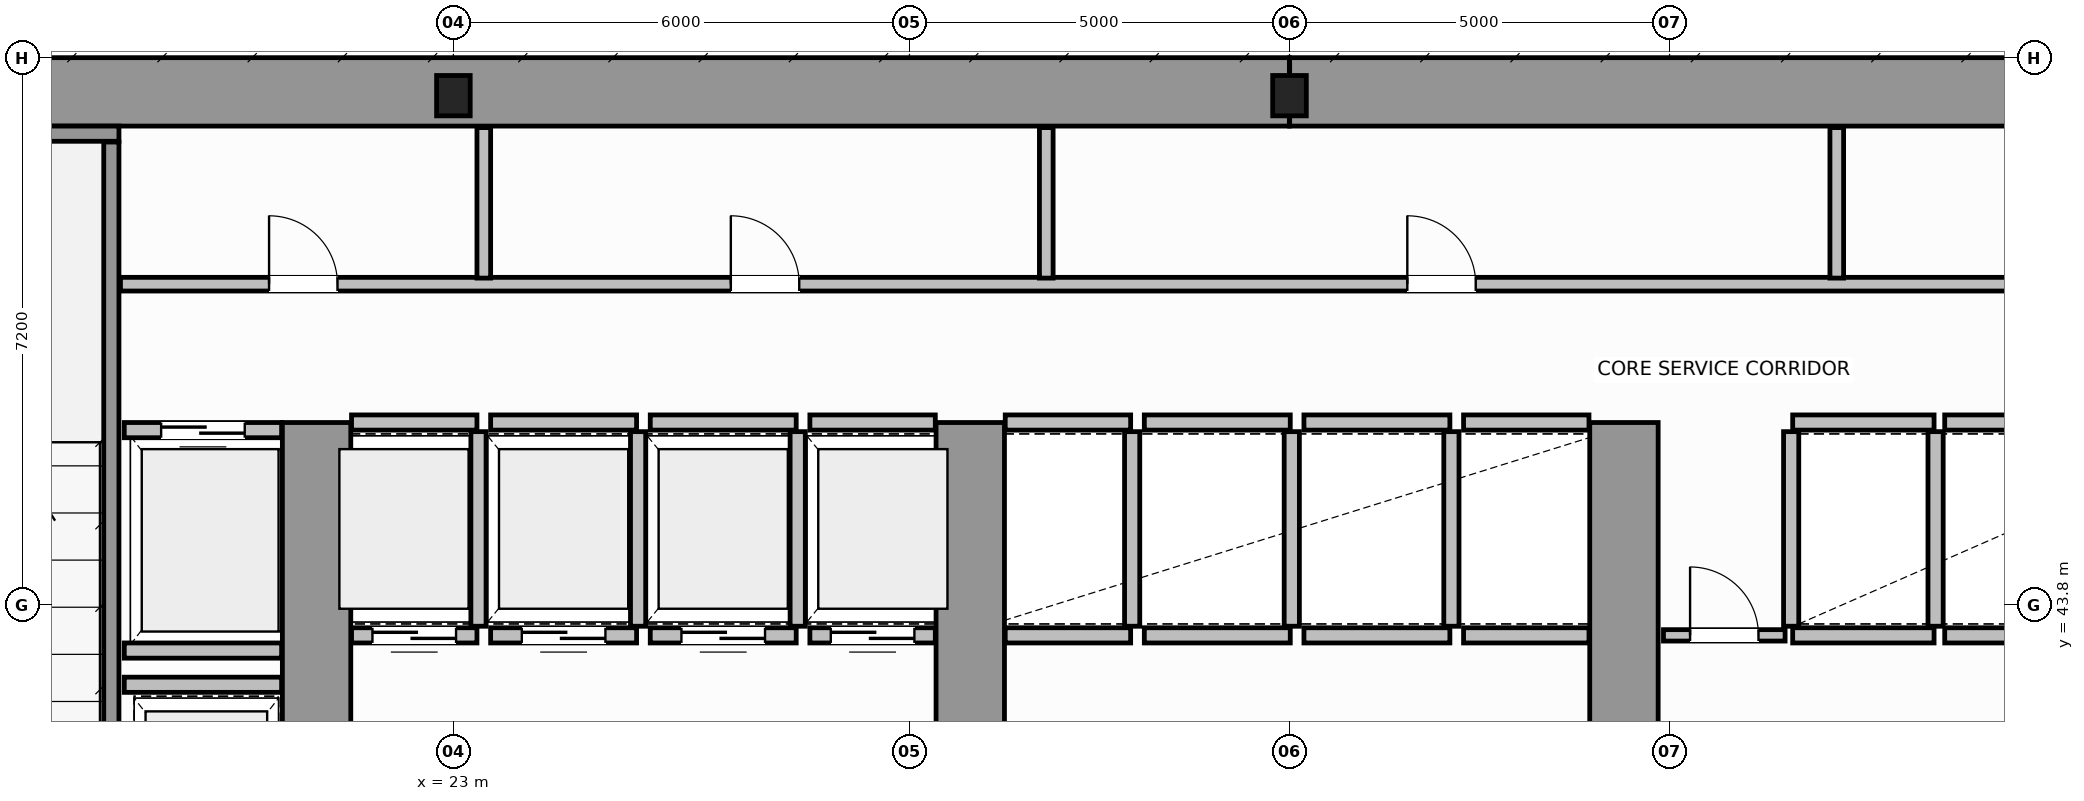
"""IFC4 building model, lengths in metres.
Left out: names, types, materials, properties, quantities, classifications, styles, units other than length and angle.
Written with IfcOpenShell. Run it as: python <this file> out.ifc"""

import sys

from ifc_helpers import new_model, si_unit, direction, frame, frame_2d, origin, origin_2d, place, context, subcontext, project, spatial, rectangle, i_section, extrude, source, transform, mapped, element, fill, save


model = new_model("IFC4")
c1 = context("Model", 3, precision=1e-05, world=origin(), true_north=direction((0.0, 1.0)))
c2 = subcontext(c1, "Body", "Model", "MODEL_VIEW")
j1 = project(units=[si_unit("LENGTHUNIT", "METRE"), si_unit("PLANEANGLEUNIT", "RADIAN")], contexts=[c1])
p1 = place(None, origin())
s1 = spatial("IfcSite", under=j1, at=p1, CompositionType="ELEMENT")
p2 = place(p1, origin())
s2 = spatial("IfcBuilding", under=s1, at=p2, CompositionType="ELEMENT")
p3 = place(p2, frame((0.0, 0.0, 83.4)))
s3 = spatial("IfcBuildingStorey", under=s2, at=p3, CompositionType="ELEMENT", Elevation=83.4)
m1 = source(origin(), c2, "Body", "SweptSolid", [
    extrude(i_section(OverallWidth=0.442, OverallDepth=0.531, WebThickness=0.065, FlangeThickness=0.076, FilletRadius=0.015, at=origin_2d()), origin(), (0.0, 0.0, 1.0), 4.8),
])
for number, where, z_axis, x_axis in (
    (1, (23.0, 50.5, 0.0), (0.0, 0.0, 1.0), (1.0, 0.0, 0.0)),
    (2, (34.0, 50.5, 0.0), (0.0, 0.0, 1.0), (1.0, 0.0, 0.0)),
):
    element("IfcColumn", number, at=place(p3, frame(where, z_axis=z_axis, x_axis=x_axis)), inside=s3, PredefinedType="COLUMN", context=c2, shape_type="MappedRepresentation", body=[
        mapped(m1, transform((0.0, 0.0, 0.0), scale=1.0)),
    ])
for number, where, z_axis, x_axis in (
    (3, (14.454, 50.55, 0.0), (0.0, 0.0, 1.0), (1.0, 0.0, 0.0)),
    (4, (34.002, 50.55, 0.0), (0.0, 0.0, 1.0), (1.0, 0.0, 0.0)),
):
    element("IfcWall", number, at=place(p3, frame(where, z_axis=z_axis, x_axis=x_axis)), inside=s3, PredefinedType="SHEAR", context=c2, shape_type="SweptSolid", body=[
        extrude(rectangle(XDim=19.544, YDim=0.9, at=frame_2d((9.772, 0.0))), origin(), (0.0, 0.0, 1.0), 4.8),
    ])
p4 = place(p3, frame((21.2, 36.97, 0.0), z_axis=(0.0, 0.0, 1.0), x_axis=(0.0, 1.0, 0.0)))
e5 = element("IfcWall", 5, at=p4, inside=s3, PredefinedType="SHEAR", context=c2, shape_type="SweptSolid", body=[
    extrude(rectangle(XDim=9.23, YDim=0.9, at=frame_2d((4.615, 0.0))), origin(), (0.0, 0.0, 1.0), 4.8),
])
p5 = place(p3, frame((29.8, 36.97, 0.0), z_axis=(0.0, 0.0, 1.0), x_axis=(0.0, 1.0, 0.0)))
e6 = element("IfcWall", 6, at=p5, inside=s3, PredefinedType="SHEAR", context=c2, shape_type="SweptSolid", body=[
    extrude(rectangle(XDim=9.23, YDim=0.9, at=frame_2d((4.615, 0.0))), origin(), (0.0, 0.0, 1.0), 4.8),
])
p6 = place(p5, frame((4.05, 0.0, 0.0)))
e7 = element("IfcOpeningElement", 7, at=p6, cuts=e6, PredefinedType="OPENING", context=c2, shape_type="SweptSolid", body=[
    extrude(rectangle(XDim=1.1, YDim=2.15, at=frame_2d((0.55, 1.075))), frame((0.0, 0.46, 0.0), z_axis=(0.0, -1.0, 0.0), x_axis=(1.0, 0.0, 0.0)), (0.0, 0.0, 1.0), 0.92),
])
p7 = place(p3, frame((38.4, 36.97, 0.0), z_axis=(0.0, 0.0, 1.0), x_axis=(0.0, 1.0, 0.0)))
e8 = element("IfcWall", 8, at=p7, inside=s3, PredefinedType="SHEAR", context=c2, shape_type="SweptSolid", body=[
    extrude(rectangle(XDim=9.23, YDim=0.9, at=frame_2d((4.615, 0.0))), origin(), (0.0, 0.0, 1.0), 4.8),
])
p8 = place(p7, frame((4.05, 0.0, 0.0)))
e9 = element("IfcOpeningElement", 9, at=p8, cuts=e8, PredefinedType="OPENING", context=c2, shape_type="SweptSolid", body=[
    extrude(rectangle(XDim=1.1, YDim=2.15, at=frame_2d((0.55, 1.075))), frame((0.0, 0.46, 0.0), z_axis=(0.0, -1.0, 0.0), x_axis=(1.0, 0.0, 0.0)), (0.0, 0.0, 1.0), 0.92),
])
p9 = place(p3, frame((14.45, 50.0, 0.0), z_axis=(0.0, 0.0, 1.0), x_axis=(1.0, 0.0, 0.0)))
e10 = element("IfcWall", 10, at=p9, inside=s3, PredefinedType="SOLIDWALL", context=c2, shape_type="SweptSolid", body=[
    extrude(rectangle(XDim=4.15, YDim=0.2, at=frame_2d((2.075, 0.0))), origin(), (0.0, 0.0, 1.0), 4.8),
])
p10 = place(p3, frame((18.5, 39.96, 0.0), z_axis=(0.0, 0.0, 1.0), x_axis=(0.0, 1.0, 0.0)))
e11 = element("IfcWall", 11, at=p10, inside=s3, PredefinedType="SOLIDWALL", context=c2, shape_type="SweptSolid", body=[
    extrude(rectangle(XDim=9.93, YDim=0.2, at=frame_2d((4.965, 0.0))), origin(), (0.0, 0.0, 1.0), 4.8),
])
p11 = place(p3, frame((21.66, 43.4, 0.0), z_axis=(0.0, 0.0, 1.0), x_axis=(1.0, 0.0, 0.0)))
e12 = element("IfcWall", 12, at=p11, inside=s3, PredefinedType="SOLIDWALL", context=c2, shape_type="SweptSolid", body=[
    extrude(rectangle(XDim=1.65, YDim=0.2, at=frame_2d((0.825, 0.0))), origin(), (0.0, 0.0, 1.0), 4.54),
])
p12 = place(p11, frame((0.275, 0.0, 0.0)))
e13 = element("IfcOpeningElement", 13, at=p12, cuts=e12, PredefinedType="OPENING", context=c2, shape_type="SweptSolid", body=[
    extrude(rectangle(XDim=1.1, YDim=2.15, at=frame_2d((0.55, 1.075))), frame((0.0, 0.11, 0.0), z_axis=(0.0, -1.0, 0.0), x_axis=(1.0, 0.0, 0.0)), (0.0, 0.0, 1.0), 0.22),
])
p13 = place(p3, frame((21.66, 46.2, 0.0), z_axis=(0.0, 0.0, 1.0), x_axis=(1.0, 0.0, 0.0)))
e14 = element("IfcWall", 14, at=p13, inside=s3, PredefinedType="SOLIDWALL", context=c2, shape_type="SweptSolid", body=[
    extrude(rectangle(XDim=1.65, YDim=0.2, at=frame_2d((0.825, 0.0))), origin(), (0.0, 0.0, 1.0), 4.54),
])
p14 = place(p3, frame((23.33, 43.52, 0.0), z_axis=(0.0, 0.0, 1.0), x_axis=(0.0, 1.0, 0.0)))
e15 = element("IfcWall", 15, at=p14, inside=s3, PredefinedType="SOLIDWALL", context=c2, shape_type="SweptSolid", body=[
    extrude(rectangle(XDim=2.56, YDim=0.2, at=frame_2d((1.28, 0.0))), origin(), (0.0, 0.0, 1.0), 4.54),
])
p15 = place(p3, frame((23.49, 43.4, 0.0), z_axis=(0.0, 0.0, 1.0), x_axis=(1.0, 0.0, 0.0)))
e16 = element("IfcWall", 16, at=p15, inside=s3, PredefinedType="SOLIDWALL", context=c2, shape_type="SweptSolid", body=[
    extrude(rectangle(XDim=1.92, YDim=0.2, at=frame_2d((0.96, 0.0))), origin(), (0.0, 0.0, 1.0), 4.54),
])
p16 = place(p15, frame((0.41, 0.0, 0.0)))
e17 = element("IfcOpeningElement", 17, at=p16, cuts=e16, PredefinedType="OPENING", context=c2, shape_type="SweptSolid", body=[
    extrude(rectangle(XDim=1.1, YDim=2.15, at=frame_2d((0.55, 1.075))), frame((0.0, 0.11, 0.0), z_axis=(0.0, -1.0, 0.0), x_axis=(1.0, 0.0, 0.0)), (0.0, 0.0, 1.0), 0.22),
])
p17 = place(p3, frame((23.49, 46.2, 0.0), z_axis=(0.0, 0.0, 1.0), x_axis=(1.0, 0.0, 0.0)))
e18 = element("IfcWall", 18, at=p17, inside=s3, PredefinedType="SOLIDWALL", context=c2, shape_type="SweptSolid", body=[
    extrude(rectangle(XDim=1.92, YDim=0.2, at=frame_2d((0.96, 0.0))), origin(), (0.0, 0.0, 1.0), 4.54),
])
p18 = place(p3, frame((25.43, 43.52, 0.0), z_axis=(0.0, 0.0, 1.0), x_axis=(0.0, 1.0, 0.0)))
e19 = element("IfcWall", 19, at=p18, inside=s3, PredefinedType="SOLIDWALL", context=c2, shape_type="SweptSolid", body=[
    extrude(rectangle(XDim=2.56, YDim=0.2, at=frame_2d((1.28, 0.0))), origin(), (0.0, 0.0, 1.0), 4.54),
])
p19 = place(p3, frame((25.59, 43.4, 0.0), z_axis=(0.0, 0.0, 1.0), x_axis=(1.0, 0.0, 0.0)))
e20 = element("IfcWall", 20, at=p19, inside=s3, PredefinedType="SOLIDWALL", context=c2, shape_type="SweptSolid", body=[
    extrude(rectangle(XDim=1.92, YDim=0.2, at=frame_2d((0.96, 0.0))), origin(), (0.0, 0.0, 1.0), 4.54),
])
p20 = place(p19, frame((0.41, 0.0, 0.0)))
e21 = element("IfcOpeningElement", 21, at=p20, cuts=e20, PredefinedType="OPENING", context=c2, shape_type="SweptSolid", body=[
    extrude(rectangle(XDim=1.1, YDim=2.15, at=frame_2d((0.55, 1.075))), frame((0.0, 0.11, 0.0), z_axis=(0.0, -1.0, 0.0), x_axis=(1.0, 0.0, 0.0)), (0.0, 0.0, 1.0), 0.22),
])
p21 = place(p3, frame((25.59, 46.2, 0.0), z_axis=(0.0, 0.0, 1.0), x_axis=(1.0, 0.0, 0.0)))
e22 = element("IfcWall", 22, at=p21, inside=s3, PredefinedType="SOLIDWALL", context=c2, shape_type="SweptSolid", body=[
    extrude(rectangle(XDim=1.92, YDim=0.2, at=frame_2d((0.96, 0.0))), origin(), (0.0, 0.0, 1.0), 4.54),
])
p22 = place(p3, frame((27.53, 43.52, 0.0), z_axis=(0.0, 0.0, 1.0), x_axis=(0.0, 1.0, 0.0)))
e23 = element("IfcWall", 23, at=p22, inside=s3, PredefinedType="SOLIDWALL", context=c2, shape_type="SweptSolid", body=[
    extrude(rectangle(XDim=2.56, YDim=0.2, at=frame_2d((1.28, 0.0))), origin(), (0.0, 0.0, 1.0), 4.54),
])
p23 = place(p3, frame((27.69, 43.4, 0.0), z_axis=(0.0, 0.0, 1.0), x_axis=(1.0, 0.0, 0.0)))
e24 = element("IfcWall", 24, at=p23, inside=s3, PredefinedType="SOLIDWALL", context=c2, shape_type="SweptSolid", body=[
    extrude(rectangle(XDim=1.65, YDim=0.2, at=frame_2d((0.825, 0.0))), origin(), (0.0, 0.0, 1.0), 4.54),
])
p24 = place(p23, frame((0.275, 0.0, 0.0)))
e25 = element("IfcOpeningElement", 25, at=p24, cuts=e24, PredefinedType="OPENING", context=c2, shape_type="SweptSolid", body=[
    extrude(rectangle(XDim=1.1, YDim=2.15, at=frame_2d((0.55, 1.075))), frame((0.0, 0.11, 0.0), z_axis=(0.0, -1.0, 0.0), x_axis=(1.0, 0.0, 0.0)), (0.0, 0.0, 1.0), 0.22),
])
p25 = place(p3, frame((27.69, 46.2, 0.0), z_axis=(0.0, 0.0, 1.0), x_axis=(1.0, 0.0, 0.0)))
e26 = element("IfcWall", 26, at=p25, inside=s3, PredefinedType="SOLIDWALL", context=c2, shape_type="SweptSolid", body=[
    extrude(rectangle(XDim=1.65, YDim=0.2, at=frame_2d((0.825, 0.0))), origin(), (0.0, 0.0, 1.0), 4.54),
])
for number, where, z_axis, x_axis in (
    (27, (30.26, 43.4, 0.0), (0.0, 0.0, 1.0), (1.0, 0.0, 0.0)),
    (28, (30.26, 46.2, 0.0), (0.0, 0.0, 1.0), (1.0, 0.0, 0.0)),
):
    element("IfcWall", number, at=place(p3, frame(where, z_axis=z_axis, x_axis=x_axis)), inside=s3, PredefinedType="SOLIDWALL", context=c2, shape_type="SweptSolid", body=[
        extrude(rectangle(XDim=1.65, YDim=0.2, at=frame_2d((0.825, 0.0))), origin(), (0.0, 0.0, 1.0), 4.54),
    ])
p26 = place(p3, frame((31.93, 43.52, 0.0), z_axis=(0.0, 0.0, 1.0), x_axis=(0.0, 1.0, 0.0)))
e29 = element("IfcWall", 29, at=p26, inside=s3, PredefinedType="SOLIDWALL", context=c2, shape_type="SweptSolid", body=[
    extrude(rectangle(XDim=2.56, YDim=0.2, at=frame_2d((1.28, 0.0))), origin(), (0.0, 0.0, 1.0), 4.54),
])
for number, where, z_axis, x_axis in (
    (30, (32.09, 43.4, 0.0), (0.0, 0.0, 1.0), (1.0, 0.0, 0.0)),
    (31, (32.09, 46.2, 0.0), (0.0, 0.0, 1.0), (1.0, 0.0, 0.0)),
):
    element("IfcWall", number, at=place(p3, frame(where, z_axis=z_axis, x_axis=x_axis)), inside=s3, PredefinedType="SOLIDWALL", context=c2, shape_type="SweptSolid", body=[
        extrude(rectangle(XDim=1.92, YDim=0.2, at=frame_2d((0.96, 0.0))), origin(), (0.0, 0.0, 1.0), 4.54),
    ])
p27 = place(p3, frame((34.03, 43.52, 0.0), z_axis=(0.0, 0.0, 1.0), x_axis=(0.0, 1.0, 0.0)))
e32 = element("IfcWall", 32, at=p27, inside=s3, PredefinedType="SOLIDWALL", context=c2, shape_type="SweptSolid", body=[
    extrude(rectangle(XDim=2.56, YDim=0.2, at=frame_2d((1.28, 0.0))), origin(), (0.0, 0.0, 1.0), 4.54),
])
for number, where, z_axis, x_axis in (
    (33, (34.19, 43.4, 0.0), (0.0, 0.0, 1.0), (1.0, 0.0, 0.0)),
    (34, (34.19, 46.2, 0.0), (0.0, 0.0, 1.0), (1.0, 0.0, 0.0)),
):
    element("IfcWall", number, at=place(p3, frame(where, z_axis=z_axis, x_axis=x_axis)), inside=s3, PredefinedType="SOLIDWALL", context=c2, shape_type="SweptSolid", body=[
        extrude(rectangle(XDim=1.92, YDim=0.2, at=frame_2d((0.96, 0.0))), origin(), (0.0, 0.0, 1.0), 4.54),
    ])
p28 = place(p3, frame((36.13, 43.52, 0.0), z_axis=(0.0, 0.0, 1.0), x_axis=(0.0, 1.0, 0.0)))
e35 = element("IfcWall", 35, at=p28, inside=s3, PredefinedType="SOLIDWALL", context=c2, shape_type="SweptSolid", body=[
    extrude(rectangle(XDim=2.56, YDim=0.2, at=frame_2d((1.28, 0.0))), origin(), (0.0, 0.0, 1.0), 4.54),
])
for number, where, z_axis, x_axis in (
    (36, (36.29, 43.4, 0.0), (0.0, 0.0, 1.0), (1.0, 0.0, 0.0)),
    (37, (36.29, 46.2, 0.0), (0.0, 0.0, 1.0), (1.0, 0.0, 0.0)),
):
    element("IfcWall", number, at=place(p3, frame(where, z_axis=z_axis, x_axis=x_axis)), inside=s3, PredefinedType="SOLIDWALL", context=c2, shape_type="SweptSolid", body=[
        extrude(rectangle(XDim=1.65, YDim=0.2, at=frame_2d((0.825, 0.0))), origin(), (0.0, 0.0, 1.0), 4.54),
    ])
for number, where, z_axis, x_axis in (
    (38, (40.62, 43.4, 0.0), (0.0, 0.0, 1.0), (1.0, 0.0, 0.0)),
    (39, (40.62, 46.2, 0.0), (0.0, 0.0, 1.0), (1.0, 0.0, 0.0)),
):
    element("IfcWall", number, at=place(p3, frame(where, z_axis=z_axis, x_axis=x_axis)), inside=s3, PredefinedType="SOLIDWALL", context=c2, shape_type="SweptSolid", body=[
        extrude(rectangle(XDim=1.86, YDim=0.2, at=frame_2d((0.93, 0.0))), origin(), (0.0, 0.0, 1.0), 4.54),
    ])
for number, where, z_axis, x_axis in (
    (40, (40.6, 43.52, 0.0), (0.0, 0.0, 1.0), (0.0, 1.0, 0.0)),
    (41, (42.5, 43.52, 0.0), (0.0, 0.0, 1.0), (0.0, 1.0, 0.0)),
):
    element("IfcWall", number, at=place(p3, frame(where, z_axis=z_axis, x_axis=x_axis)), inside=s3, PredefinedType="SOLIDWALL", context=c2, shape_type="SweptSolid", body=[
        extrude(rectangle(XDim=2.56, YDim=0.2, at=frame_2d((1.28, 0.0))), origin(), (0.0, 0.0, 1.0), 4.54),
    ])
for number, where, z_axis, x_axis in (
    (42, (42.62, 43.4, 0.0), (0.0, 0.0, 1.0), (1.0, 0.0, 0.0)),
    (43, (42.62, 46.2, 0.0), (0.0, 0.0, 1.0), (1.0, 0.0, 0.0)),
):
    element("IfcWall", number, at=place(p3, frame(where, z_axis=z_axis, x_axis=x_axis)), inside=s3, PredefinedType="SOLIDWALL", context=c2, shape_type="SweptSolid", body=[
        extrude(rectangle(XDim=1.86, YDim=0.2, at=frame_2d((0.93, 0.0))), origin(), (0.0, 0.0, 1.0), 4.54),
    ])
p29 = place(p3, frame((18.67, 46.1, 0.0), z_axis=(0.0, 0.0, 1.0), x_axis=(1.0, 0.0, 0.0)))
e44 = element("IfcWall", 44, at=p29, inside=s3, PredefinedType="SOLIDWALL", context=c2, shape_type="SweptSolid", body=[
    extrude(rectangle(XDim=2.07, YDim=0.2, at=frame_2d((1.035, 0.0))), origin(), (0.0, 0.0, 1.0), 4.54),
])
p30 = place(p29, frame((0.485, 0.0, 0.0)))
e45 = element("IfcOpeningElement", 45, at=p30, cuts=e44, PredefinedType="OPENING", context=c2, shape_type="SweptSolid", body=[
    extrude(rectangle(XDim=1.1, YDim=2.15, at=frame_2d((0.55, 1.075))), frame((0.0, 0.11, 0.0), z_axis=(0.0, -1.0, 0.0), x_axis=(1.0, 0.0, 0.0)), (0.0, 0.0, 1.0), 0.22),
])
for number, where, z_axis, x_axis in (
    (46, (18.67, 43.2, 0.0), (0.0, 0.0, 1.0), (1.0, 0.0, 0.0)),
    (47, (18.67, 42.75, 0.0), (0.0, 0.0, 1.0), (1.0, 0.0, 0.0)),
):
    element("IfcWall", number, at=place(p3, frame(where, z_axis=z_axis, x_axis=x_axis)), inside=s3, PredefinedType="SOLIDWALL", context=c2, shape_type="SweptSolid", body=[
        extrude(rectangle(XDim=2.07, YDim=0.2, at=frame_2d((1.035, 0.0))), origin(), (0.0, 0.0, 1.0), 4.54),
    ])
p31 = place(p3, frame((38.92, 43.4, 0.0), z_axis=(0.0, 0.0, 1.0), x_axis=(1.0, 0.0, 0.0)))
e48 = element("IfcWall", 48, at=p31, inside=s3, PredefinedType="PARTITIONING", context=c2, shape_type="SweptSolid", body=[
    extrude(rectangle(XDim=1.6, YDim=0.15, at=frame_2d((0.8, 0.0))), origin(), (0.0, 0.0, 1.0), 4.54),
])
p32 = place(p31, frame((0.35, 0.0, 0.0)))
e49 = element("IfcOpeningElement", 49, at=p32, cuts=e48, PredefinedType="OPENING", context=c2, shape_type="SweptSolid", body=[
    extrude(rectangle(XDim=0.9, YDim=2.1, at=frame_2d((0.45, 1.05))), frame((0.0, 0.085, 0.0), z_axis=(0.0, -1.0, 0.0), x_axis=(1.0, 0.0, 0.0)), (0.0, 0.0, 1.0), 0.17),
])
p33 = place(p3, frame((18.62, 48.02, 0.0), z_axis=(0.0, 0.0, 1.0), x_axis=(1.0, 0.0, 0.0)))
e50 = element("IfcWall", 50, at=p33, inside=s3, PredefinedType="PLUMBINGWALL", context=c2, shape_type="SweptSolid", body=[
    extrude(rectangle(XDim=30.76, YDim=0.18, at=frame_2d((15.38, 0.0))), origin(), (0.0, 0.0, 1.0), 4.54),
])
p34 = place(p33, frame((1.955, 0.0, 0.0)))
e51 = element("IfcOpeningElement", 51, at=p34, cuts=e50, PredefinedType="OPENING", context=c2, shape_type="SweptSolid", body=[
    extrude(rectangle(XDim=0.9, YDim=2.15, at=frame_2d((0.45, 1.075))), frame((0.0, 0.1, 0.0), z_axis=(0.0, -1.0, 0.0), x_axis=(1.0, 0.0, 0.0)), (0.0, 0.0, 1.0), 0.2),
])
p35 = place(p33, frame((8.03, 0.0, 0.0)))
e52 = element("IfcOpeningElement", 52, at=p35, cuts=e50, PredefinedType="OPENING", context=c2, shape_type="SweptSolid", body=[
    extrude(rectangle(XDim=0.9, YDim=2.15, at=frame_2d((0.45, 1.075))), frame((0.0, 0.1, 0.0), z_axis=(0.0, -1.0, 0.0), x_axis=(1.0, 0.0, 0.0)), (0.0, 0.0, 1.0), 0.2),
])
p36 = place(p33, frame((16.93, 0.0, 0.0)))
e53 = element("IfcOpeningElement", 53, at=p36, cuts=e50, PredefinedType="OPENING", context=c2, shape_type="SweptSolid", body=[
    extrude(rectangle(XDim=0.9, YDim=2.15, at=frame_2d((0.45, 1.075))), frame((0.0, 0.1, 0.0), z_axis=(0.0, -1.0, 0.0), x_axis=(1.0, 0.0, 0.0)), (0.0, 0.0, 1.0), 0.2),
])
p37 = place(p33, frame((26.205, 0.0, 0.0)))
e54 = element("IfcOpeningElement", 54, at=p37, cuts=e50, PredefinedType="OPENING", context=c2, shape_type="SweptSolid", body=[
    extrude(rectangle(XDim=0.9, YDim=2.15, at=frame_2d((0.45, 1.075))), frame((0.0, 0.1, 0.0), z_axis=(0.0, -1.0, 0.0), x_axis=(1.0, 0.0, 0.0)), (0.0, 0.0, 1.0), 0.2),
])
for number, where, z_axis, x_axis in (
    (55, (23.4, 48.1, 0.0), (0.0, 0.0, 1.0), (0.0, 1.0, 0.0)),
    (56, (30.8, 48.1, 0.0), (0.0, 0.0, 1.0), (0.0, 1.0, 0.0)),
    (57, (41.2, 48.1, 0.0), (0.0, 0.0, 1.0), (0.0, 1.0, 0.0)),
):
    element("IfcWall", number, at=place(p3, frame(where, z_axis=z_axis, x_axis=x_axis)), inside=s3, PredefinedType="PLUMBINGWALL", context=c2, shape_type="SweptSolid", body=[
        extrude(rectangle(XDim=1.98, YDim=0.18, at=frame_2d((0.99, 0.0))), origin(), (0.0, 0.0, 1.0), 4.54),
    ])
m2 = source(origin(), c2, "Body", "SweptSolid", [
    extrude(rectangle(XDim=1.1, YDim=2.15, at=frame_2d((0.55, 1.075))), frame((0.0, 0.025, 0.0), z_axis=(0.0, -1.0, 0.0), x_axis=(1.0, 0.0, 0.0)), (0.0, 0.0, 1.0), 0.05),
])
p38 = place(p12, origin())
e58 = element("IfcDoor", 58, at=p38, inside=s3, OperationType="DOUBLE_DOOR_SLIDING", PredefinedType="DOOR", context=c2, shape_type="MappedRepresentation", body=[
    mapped(m2, transform((0.0, 0.0, 0.0), scale=1.0)),
])
fill(e13, e58)
p39 = place(p16, origin())
e59 = element("IfcDoor", 59, at=p39, inside=s3, OperationType="DOUBLE_DOOR_SLIDING", PredefinedType="DOOR", context=c2, shape_type="MappedRepresentation", body=[
    mapped(m2, transform((0.0, 0.0, 0.0), scale=1.0)),
])
fill(e17, e59)
p40 = place(p20, origin())
e60 = element("IfcDoor", 60, at=p40, inside=s3, OperationType="DOUBLE_DOOR_SLIDING", PredefinedType="DOOR", context=c2, shape_type="MappedRepresentation", body=[
    mapped(m2, transform((0.0, 0.0, 0.0), scale=1.0)),
])
fill(e21, e60)
p41 = place(p24, origin())
e61 = element("IfcDoor", 61, at=p41, inside=s3, OperationType="DOUBLE_DOOR_SLIDING", PredefinedType="DOOR", context=c2, shape_type="MappedRepresentation", body=[
    mapped(m2, transform((0.0, 0.0, 0.0), scale=1.0)),
])
fill(e25, e61)
p42 = place(p30, origin())
e62 = element("IfcDoor", 62, at=p42, inside=s3, OperationType="DOUBLE_DOOR_SLIDING", PredefinedType="DOOR", context=c2, shape_type="MappedRepresentation", body=[
    mapped(m2, transform((0.0, 0.0, 0.0), scale=1.0)),
])
fill(e45, e62)
m3 = source(origin(), c2, "Body", "SweptSolid", [
    extrude(rectangle(XDim=0.9, YDim=2.1, at=frame_2d((0.45, 1.05))), frame((0.0, 0.025, 0.0), z_axis=(0.0, -1.0, 0.0), x_axis=(1.0, 0.0, 0.0)), (0.0, 0.0, 1.0), 0.05),
])
p43 = place(p32, origin())
e63 = element("IfcDoor", 63, at=p43, inside=s3, OperationType="SINGLE_SWING_LEFT", PredefinedType="DOOR", context=c2, shape_type="MappedRepresentation", body=[
    mapped(m3, transform((0.0, 0.0, 0.0), scale=1.0)),
])
fill(e49, e63)
m4 = source(origin(), c2, "Body", "SweptSolid", [
    extrude(rectangle(XDim=0.9, YDim=2.15, at=frame_2d((0.45, 1.075))), frame((0.0, 0.025, 0.0), z_axis=(0.0, -1.0, 0.0), x_axis=(1.0, 0.0, 0.0)), (0.0, 0.0, 1.0), 0.05),
])
p44 = place(p34, origin())
e64 = element("IfcDoor", 64, at=p44, inside=s3, OperationType="SINGLE_SWING_LEFT", PredefinedType="DOOR", context=c2, shape_type="MappedRepresentation", body=[
    mapped(m4, transform((0.0, 0.0, 0.0), scale=1.0)),
])
fill(e51, e64)
p45 = place(p35, origin())
e65 = element("IfcDoor", 65, at=p45, inside=s3, OperationType="SINGLE_SWING_RIGHT", PredefinedType="DOOR", context=c2, shape_type="MappedRepresentation", body=[
    mapped(m4, transform((0.0, 0.0, 0.0), scale=1.0)),
])
fill(e52, e65)
p46 = place(p36, origin())
e66 = element("IfcDoor", 66, at=p46, inside=s3, OperationType="SINGLE_SWING_LEFT", PredefinedType="DOOR", context=c2, shape_type="MappedRepresentation", body=[
    mapped(m4, transform((0.0, 0.0, 0.0), scale=1.0)),
])
fill(e53, e66)
save(model, sys.argv[1])
